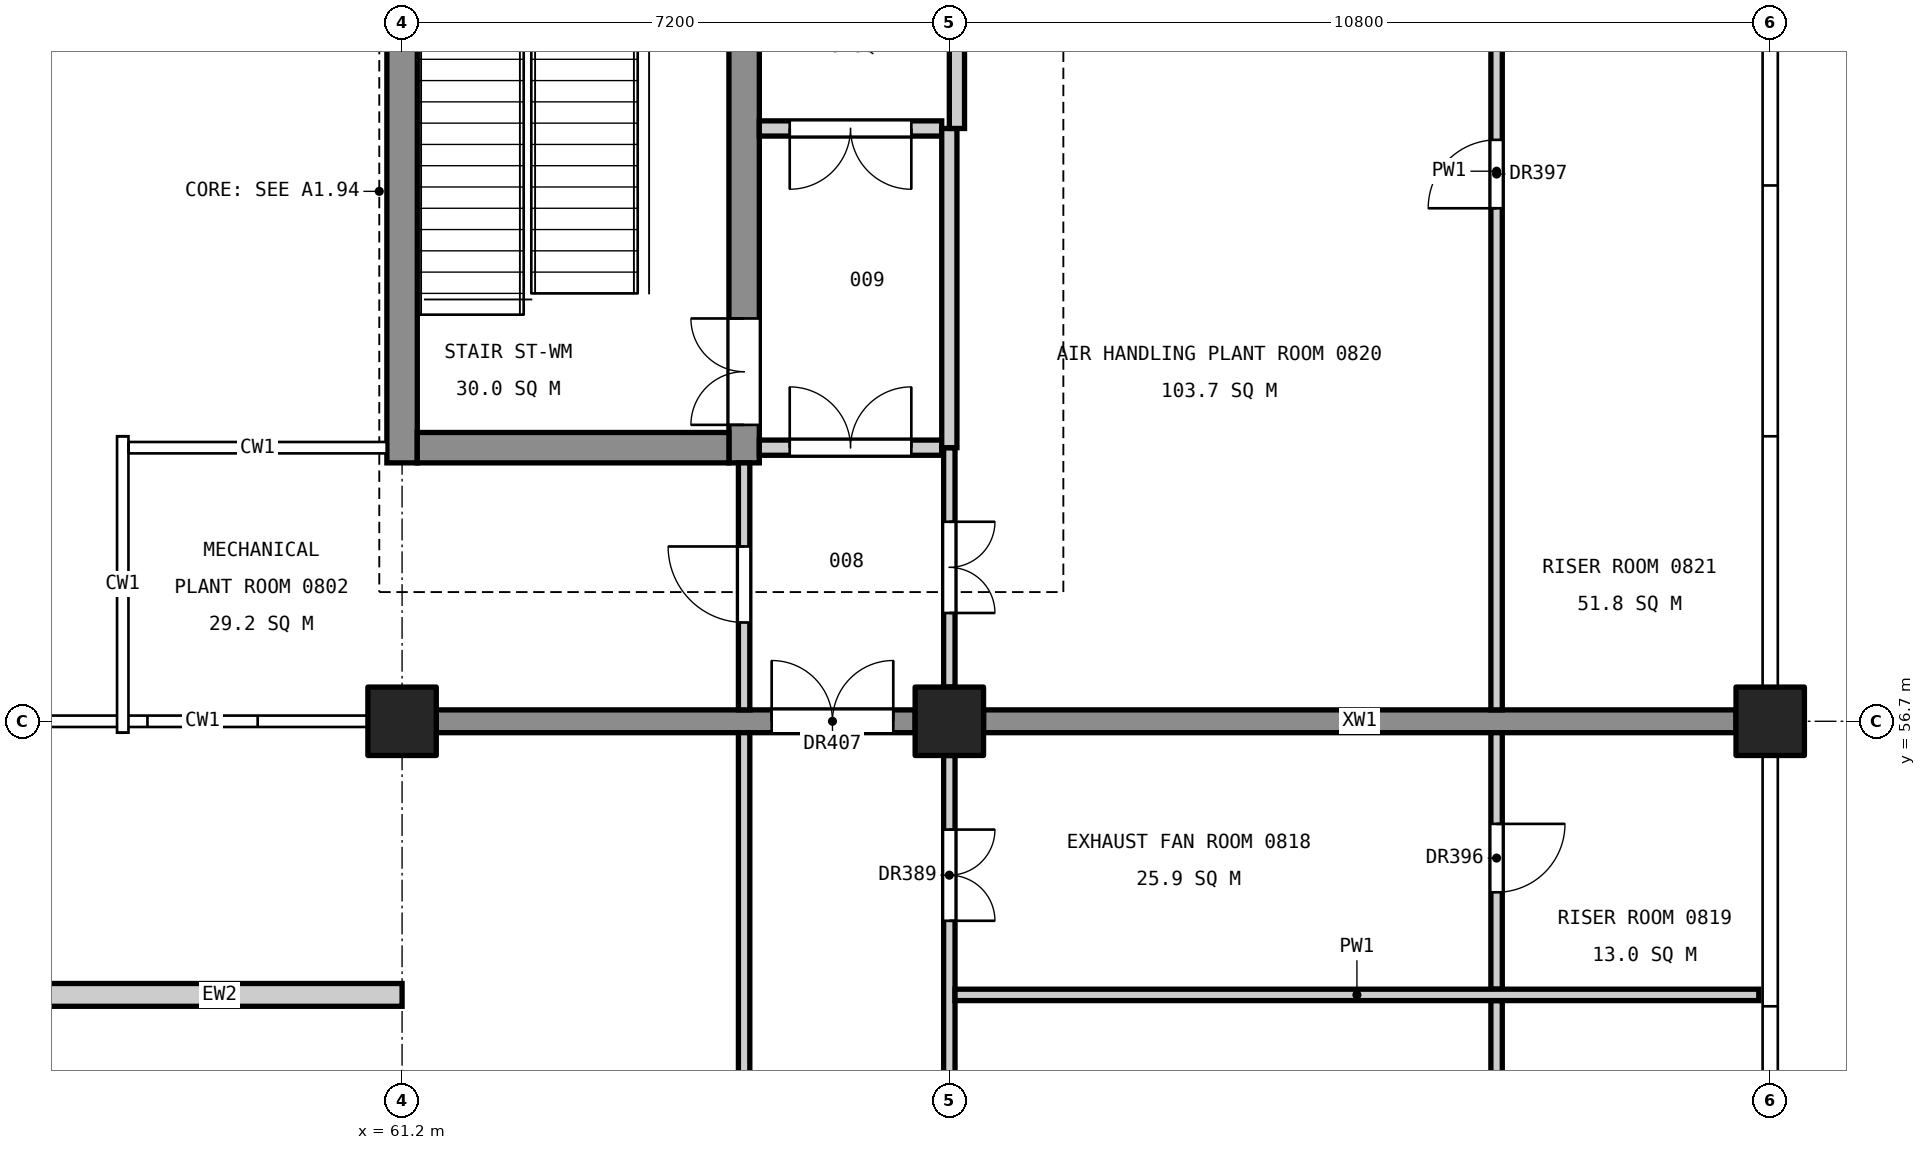
"""IFC4 building model, lengths in metres.
Left out: names, types, materials, properties, quantities, classifications, styles, units other than length and angle.
Written with IfcOpenShell. Run it as: python <this file> out.ifc"""

import sys

from ifc_helpers import new_model, si_unit, direction, frame, frame_2d, origin, origin_2d, place, context, subcontext, project, spatial, rectangle, extrude, element, fill, save


model = new_model("IFC4")
c1 = context("Model", 3, precision=1e-05, world=origin(), true_north=direction((0.0, 1.0)))
c2 = subcontext(c1, "Body", "Model", "MODEL_VIEW")
j1 = project(units=[si_unit("LENGTHUNIT", "METRE"), si_unit("PLANEANGLEUNIT", "RADIAN")], contexts=[c1])
p1 = place(None, origin())
s1 = spatial("IfcSite", under=j1, at=p1, CompositionType="ELEMENT")
p2 = place(p1, origin())
s2 = spatial("IfcBuilding", under=s1, at=p2, CompositionType="ELEMENT")
p3 = place(p2, frame((0.0, 0.0, 41.4)))
s3 = spatial("IfcBuildingStorey", under=s2, at=p3, CompositionType="ELEMENT", Elevation=41.4)
for number, where, z_axis, x_axis in (
    (1, (61.2, 56.7, 0.0), (0.0, 0.0, 1.0), (1.0, 0.0, 0.0)),
    (2, (68.4, 56.7, 0.0), (0.0, 0.0, 1.0), (1.0, 0.0, 0.0)),
    (3, (79.2, 56.7, 0.0), (0.0, 0.0, 1.0), (1.0, 0.0, 0.0)),
):
    element("IfcColumn", number, at=place(p3, frame(where, z_axis=z_axis, x_axis=x_axis)), inside=s3, PredefinedType="COLUMN", context=c2, shape_type="SweptSolid", body=[
        extrude(rectangle(XDim=0.9, YDim=0.9, at=origin_2d()), origin(), (0.0, 0.0, 1.0), 4.8),
    ])
p4 = place(p3, frame((61.2, 60.1, 0.0), z_axis=(0.0, 0.0, 1.0), x_axis=(0.0, 1.0, 0.0)))
e4 = element("IfcWall", 4, at=p4, inside=s3, PredefinedType="SHEAR", context=c2, shape_type="SweptSolid", body=[
    extrude(rectangle(XDim=14.8, YDim=0.4, at=frame_2d((7.4, 0.0))), origin(), (0.0, 0.0, 1.0), 4.55),
])
p5 = place(p4, frame((6.11, 0.0, 3.4)))
e5 = element("IfcOpeningElement", 5, at=p5, cuts=e4, PredefinedType="OPENING", context=c2, shape_type="SweptSolid", body=[
    extrude(rectangle(XDim=1.2, YDim=0.9, at=frame_2d((0.6, 0.45))), frame((0.0, 0.21, 0.0), z_axis=(0.0, -1.0, 0.0), x_axis=(1.0, 0.0, 0.0)), (0.0, 0.0, 1.0), 0.42),
])
p6 = place(p3, frame((65.7, 60.1, 0.0), z_axis=(0.0, 0.0, 1.0), x_axis=(0.0, 1.0, 0.0)))
e6 = element("IfcWall", 6, at=p6, inside=s3, PredefinedType="SHEAR", context=c2, shape_type="SweptSolid", body=[
    extrude(rectangle(XDim=14.8, YDim=0.4, at=frame_2d((7.4, 0.0))), origin(), (0.0, 0.0, 1.0), 4.55),
])
p7 = place(p6, frame((0.5, 0.0, 0.0)))
e7 = element("IfcOpeningElement", 7, at=p7, cuts=e6, PredefinedType="OPENING", context=c2, shape_type="SweptSolid", body=[
    extrude(rectangle(XDim=1.4, YDim=2.1, at=frame_2d((0.7, 1.05))), frame((0.0, 0.21, 0.0), z_axis=(0.0, -1.0, 0.0), x_axis=(1.0, 0.0, 0.0)), (0.0, 0.0, 1.0), 0.42),
])
p8 = place(p6, frame((8.8, 0.0, 0.0)))
e8 = element("IfcOpeningElement", 8, at=p8, cuts=e6, PredefinedType="OPENING", context=c2, shape_type="SweptSolid", body=[
    extrude(rectangle(XDim=1.1, YDim=2.1, at=frame_2d((0.55, 1.05))), frame((0.0, 0.21, 0.0), z_axis=(0.0, -1.0, 0.0), x_axis=(1.0, 0.0, 0.0)), (0.0, 0.0, 1.0), 0.42),
])
p9 = place(p6, frame((11.35, 0.0, 0.0)))
e9 = element("IfcOpeningElement", 9, at=p9, cuts=e6, PredefinedType="OPENING", context=c2, shape_type="SweptSolid", body=[
    extrude(rectangle(XDim=1.1, YDim=2.1, at=frame_2d((0.55, 1.05))), frame((0.0, 0.21, 0.0), z_axis=(0.0, -1.0, 0.0), x_axis=(1.0, 0.0, 0.0)), (0.0, 0.0, 1.0), 0.42),
])
p10 = place(p3, frame((61.4, 60.3, 0.0), z_axis=(0.0, 0.0, 1.0), x_axis=(1.0, 0.0, 0.0)))
e10 = element("IfcWall", 10, at=p10, inside=s3, PredefinedType="SHEAR", context=c2, shape_type="SweptSolid", body=[
    extrude(rectangle(XDim=4.1, YDim=0.4, at=frame_2d((2.05, 0.0))), origin(), (0.0, 0.0, 1.0), 4.55),
])
p11 = place(p3, frame((61.65, 56.7, 0.0), z_axis=(0.0, 0.0, 1.0), x_axis=(1.0, 0.0, 0.0)))
e11 = element("IfcWall", 11, at=p11, inside=s3, PredefinedType="SHEAR", context=c2, shape_type="SweptSolid", body=[
    extrude(rectangle(XDim=6.3, YDim=0.3, at=frame_2d((3.15, 0.0))), origin(), (0.0, 0.0, 1.0), 4.55),
])
p12 = place(p11, frame((4.413, 0.0, 0.0)))
e12 = element("IfcOpeningElement", 12, at=p12, cuts=e11, PredefinedType="OPENING", context=c2, shape_type="SweptSolid", body=[
    extrude(rectangle(XDim=1.6, YDim=2.1, at=frame_2d((0.8, 1.05))), frame((0.0, 0.16, 0.0), z_axis=(0.0, -1.0, 0.0), x_axis=(1.0, 0.0, 0.0)), (0.0, 0.0, 1.0), 0.32),
])
p13 = place(p3, frame((68.85, 56.7, 0.0), z_axis=(0.0, 0.0, 1.0), x_axis=(1.0, 0.0, 0.0)))
e13 = element("IfcWall", 13, at=p13, inside=s3, PredefinedType="SHEAR", context=c2, shape_type="SweptSolid", body=[
    extrude(rectangle(XDim=9.9, YDim=0.3, at=frame_2d((4.95, 0.0))), origin(), (0.0, 0.0, 1.0), 4.55),
])
p14 = place(p3, frame((56.4, 53.1, 0.0), z_axis=(0.0, 0.0, 1.0), x_axis=(1.0, 0.0, 0.0)))
e14 = element("IfcWall", 14, at=p14, inside=s3, PredefinedType="STANDARD", context=c2, shape_type="SweptSolid", body=[
    extrude(rectangle(XDim=4.8, YDim=0.3, at=frame_2d((2.4, 0.0))), origin(), (0.0, 0.0, 1.0), 3.65),
])
p15 = place(p3, frame((65.7, 46.1, 0.0), z_axis=(0.0, 0.0, 1.0), x_axis=(0.0, 1.0, 0.0)))
e15 = element("IfcWall", 15, at=p15, inside=s3, PredefinedType="PARTITIONING", context=c2, shape_type="SweptSolid", body=[
    extrude(rectangle(XDim=10.45, YDim=0.15, at=frame_2d((5.225, 0.0))), origin(), (0.0, 0.0, 1.0), 3.55),
])
p16 = place(p15, frame((4.7, 0.0, 0.0)))
e16 = element("IfcOpeningElement", 16, at=p16, cuts=e15, PredefinedType="OPENING", context=c2, shape_type="SweptSolid", body=[
    extrude(rectangle(XDim=1.0, YDim=2.1, at=frame_2d((0.5, 1.05))), frame((0.0, 0.085, 0.0), z_axis=(0.0, -1.0, 0.0), x_axis=(1.0, 0.0, 0.0)), (0.0, 0.0, 1.0), 0.17),
])
p17 = place(p3, frame((65.7, 56.85, 0.0), z_axis=(0.0, 0.0, 1.0), x_axis=(0.0, 1.0, 0.0)))
e17 = element("IfcWall", 17, at=p17, inside=s3, PredefinedType="PARTITIONING", context=c2, shape_type="SweptSolid", body=[
    extrude(rectangle(XDim=3.25, YDim=0.15, at=frame_2d((1.625, 0.0))), origin(), (0.0, 0.0, 1.0), 3.55),
])
p18 = place(p17, frame((1.15, 0.0, 0.0)))
e18 = element("IfcOpeningElement", 18, at=p18, cuts=e17, PredefinedType="OPENING", context=c2, shape_type="SweptSolid", body=[
    extrude(rectangle(XDim=1.0, YDim=2.1, at=frame_2d((0.5, 1.05))), frame((0.0, 0.085, 0.0), z_axis=(0.0, -1.0, 0.0), x_axis=(1.0, 0.0, 0.0)), (0.0, 0.0, 1.0), 0.17),
])
p19 = place(p3, frame((65.9, 60.3, 0.0), z_axis=(0.0, 0.0, 1.0), x_axis=(1.0, 0.0, 0.0)))
e19 = element("IfcWall", 19, at=p19, inside=s3, PredefinedType="PARTITIONING", context=c2, shape_type="SweptSolid", body=[
    extrude(rectangle(XDim=2.4, YDim=0.2, at=frame_2d((1.2, 0.0))), origin(), (0.0, 0.0, 1.0), 3.85),
])
p20 = place(p19, frame((0.4, 0.0, 0.0)))
e20 = element("IfcOpeningElement", 20, at=p20, cuts=e19, PredefinedType="OPENING", context=c2, shape_type="SweptSolid", body=[
    extrude(rectangle(XDim=1.6, YDim=2.1, at=frame_2d((0.8, 1.05))), frame((0.0, 0.11, 0.0), z_axis=(0.0, -1.0, 0.0), x_axis=(1.0, 0.0, 0.0)), (0.0, 0.0, 1.0), 0.22),
])
p21 = place(p3, frame((65.9, 64.5, 0.0), z_axis=(0.0, 0.0, 1.0), x_axis=(1.0, 0.0, 0.0)))
e21 = element("IfcWall", 21, at=p21, inside=s3, PredefinedType="PARTITIONING", context=c2, shape_type="SweptSolid", body=[
    extrude(rectangle(XDim=2.4, YDim=0.2, at=frame_2d((1.2, 0.0))), origin(), (0.0, 0.0, 1.0), 3.55),
])
p22 = place(p21, frame((0.4, 0.0, 0.0)))
e22 = element("IfcOpeningElement", 22, at=p22, cuts=e21, PredefinedType="OPENING", context=c2, shape_type="SweptSolid", body=[
    extrude(rectangle(XDim=1.6, YDim=2.1, at=frame_2d((0.8, 1.05))), frame((0.0, 0.11, 0.0), z_axis=(0.0, -1.0, 0.0), x_axis=(1.0, 0.0, 0.0)), (0.0, 0.0, 1.0), 0.22),
])
p23 = place(p3, frame((68.4, 46.35, 0.0), z_axis=(0.0, 0.0, 1.0), x_axis=(0.0, 1.0, 0.0)))
e23 = element("IfcWall", 23, at=p23, inside=s3, PredefinedType="PARTITIONING", context=c2, shape_type="SweptSolid", body=[
    extrude(rectangle(XDim=9.9, YDim=0.15, at=frame_2d((4.95, 0.0))), origin(), (0.0, 0.0, 1.0), 3.55),
])
p24 = place(p23, frame((2.775, 0.0, 0.0)))
e24 = element("IfcOpeningElement", 24, at=p24, cuts=e23, PredefinedType="OPENING", context=c2, shape_type="SweptSolid", body=[
    extrude(rectangle(XDim=1.2, YDim=2.1, at=frame_2d((0.6, 1.05))), frame((0.0, 0.085, 0.0), z_axis=(0.0, -1.0, 0.0), x_axis=(1.0, 0.0, 0.0)), (0.0, 0.0, 1.0), 0.17),
])
p25 = place(p23, frame((7.725, 0.0, 0.0)))
e25 = element("IfcOpeningElement", 25, at=p25, cuts=e23, PredefinedType="OPENING", context=c2, shape_type="SweptSolid", body=[
    extrude(rectangle(XDim=1.2, YDim=2.1, at=frame_2d((0.6, 1.05))), frame((0.0, 0.085, 0.0), z_axis=(0.0, -1.0, 0.0), x_axis=(1.0, 0.0, 0.0)), (0.0, 0.0, 1.0), 0.17),
])
p26 = place(p3, frame((68.4, 57.15, 0.0), z_axis=(0.0, 0.0, 1.0), x_axis=(0.0, 1.0, 0.0)))
e26 = element("IfcWall", 26, at=p26, inside=s3, PredefinedType="PARTITIONING", context=c2, shape_type="SweptSolid", body=[
    extrude(rectangle(XDim=3.15, YDim=0.15, at=frame_2d((1.575, 0.0))), origin(), (0.0, 0.0, 1.0), 3.55),
])
p27 = place(p26, frame((0.975, 0.0, 0.0)))
e27 = element("IfcOpeningElement", 27, at=p27, cuts=e26, PredefinedType="OPENING", context=c2, shape_type="SweptSolid", body=[
    extrude(rectangle(XDim=1.2, YDim=2.1, at=frame_2d((0.6, 1.05))), frame((0.0, 0.085, 0.0), z_axis=(0.0, -1.0, 0.0), x_axis=(1.0, 0.0, 0.0)), (0.0, 0.0, 1.0), 0.17),
])
p28 = place(p3, frame((68.4, 60.3, 0.0), z_axis=(0.0, 0.0, 1.0), x_axis=(0.0, 1.0, 0.0)))
e28 = element("IfcWall", 28, at=p28, inside=s3, PredefinedType="PARTITIONING", context=c2, shape_type="SweptSolid", body=[
    extrude(rectangle(XDim=4.2, YDim=0.2, at=frame_2d((2.1, 0.0))), origin(), (0.0, 0.0, 1.0), 3.55),
])
p29 = place(p3, frame((68.5, 64.5, 0.0), z_axis=(0.0, 0.0, 1.0), x_axis=(0.0, 1.0, 0.0)))
e29 = element("IfcWall", 29, at=p29, inside=s3, PredefinedType="PARTITIONING", context=c2, shape_type="SweptSolid", body=[
    extrude(rectangle(XDim=2.55, YDim=0.2, at=frame_2d((1.275, 0.0))), origin(), (0.0, 0.0, 1.0), 3.55),
])
p30 = place(p3, frame((75.6, 45.975, 0.0), z_axis=(0.0, 0.0, 1.0), x_axis=(0.0, 1.0, 0.0)))
e30 = element("IfcWall", 30, at=p30, inside=s3, PredefinedType="PARTITIONING", context=c2, shape_type="SweptSolid", body=[
    extrude(rectangle(XDim=7.05, YDim=0.15, at=frame_2d((3.525, 0.0))), origin(), (0.0, 0.0, 1.0), 3.55),
])
p31 = place(p30, frame((3.075, 0.0, 0.0)))
e31 = element("IfcOpeningElement", 31, at=p31, cuts=e30, PredefinedType="OPENING", context=c2, shape_type="SweptSolid", body=[
    extrude(rectangle(XDim=0.9, YDim=2.1, at=frame_2d((0.45, 1.05))), frame((0.0, 0.085, 0.0), z_axis=(0.0, -1.0, 0.0), x_axis=(1.0, 0.0, 0.0)), (0.0, 0.0, 1.0), 0.17),
])
p32 = place(p3, frame((75.6, 53.175, 0.0), z_axis=(0.0, 0.0, 1.0), x_axis=(0.0, 1.0, 0.0)))
e32 = element("IfcWall", 32, at=p32, inside=s3, PredefinedType="PARTITIONING", context=c2, shape_type="SweptSolid", body=[
    extrude(rectangle(XDim=3.375, YDim=0.15, at=frame_2d((1.688, 0.0))), origin(), (0.0, 0.0, 1.0), 3.55),
])
p33 = place(p32, frame((1.275, 0.0, 0.0)))
e33 = element("IfcOpeningElement", 33, at=p33, cuts=e32, PredefinedType="OPENING", context=c2, shape_type="SweptSolid", body=[
    extrude(rectangle(XDim=0.9, YDim=2.1, at=frame_2d((0.45, 1.05))), frame((0.0, 0.085, 0.0), z_axis=(0.0, -1.0, 0.0), x_axis=(1.0, 0.0, 0.0)), (0.0, 0.0, 1.0), 0.17),
])
p34 = place(p3, frame((75.6, 56.85, 0.0), z_axis=(0.0, 0.0, 1.0), x_axis=(0.0, 1.0, 0.0)))
e34 = element("IfcWall", 34, at=p34, inside=s3, PredefinedType="PARTITIONING", context=c2, shape_type="SweptSolid", body=[
    extrude(rectangle(XDim=14.175, YDim=0.15, at=frame_2d((7.087, 0.0))), origin(), (0.0, 0.0, 1.0), 3.55),
])
p35 = place(p34, frame((6.6, 0.0, 0.0)))
e35 = element("IfcOpeningElement", 35, at=p35, cuts=e34, PredefinedType="OPENING", context=c2, shape_type="SweptSolid", body=[
    extrude(rectangle(XDim=0.9, YDim=2.1, at=frame_2d((0.45, 1.05))), frame((0.0, 0.085, 0.0), z_axis=(0.0, -1.0, 0.0), x_axis=(1.0, 0.0, 0.0)), (0.0, 0.0, 1.0), 0.17),
])
p36 = place(p3, frame((68.475, 53.1, 0.0), z_axis=(0.0, 0.0, 1.0), x_axis=(1.0, 0.0, 0.0)))
e36 = element("IfcWall", 36, at=p36, inside=s3, PredefinedType="PARTITIONING", context=c2, shape_type="SweptSolid", body=[
    extrude(rectangle(XDim=10.575, YDim=0.15, at=frame_2d((5.288, 0.0))), origin(), (0.0, 0.0, 1.0), 3.85),
])
p37 = place(p7, origin())
e37 = element("IfcDoor", 37, at=p37, inside=s3, OperationType="DOUBLE_DOOR_SINGLE_SWING", PredefinedType="DOOR", context=c2, shape_type="SweptSolid", body=[
    extrude(rectangle(XDim=1.4, YDim=2.1, at=frame_2d((0.7, 1.05))), frame((0.0, 0.025, 0.0), z_axis=(0.0, -1.0, 0.0), x_axis=(1.0, 0.0, 0.0)), (0.0, 0.0, 1.0), 0.05),
])
fill(e7, e37)
p38 = place(p27, frame((1.2, 0.0, 0.0), z_axis=(0.0, 0.0, 1.0), x_axis=(-1.0, 0.0, 0.0)))
e38 = element("IfcDoor", 38, at=p38, inside=s3, OperationType="DOUBLE_DOOR_SINGLE_SWING", PredefinedType="DOOR", context=c2, shape_type="SweptSolid", body=[
    extrude(rectangle(XDim=1.2, YDim=2.1, at=frame_2d((0.6, 1.05))), frame((0.0, 0.025, 0.0), z_axis=(0.0, -1.0, 0.0), x_axis=(1.0, 0.0, 0.0)), (0.0, 0.0, 1.0), 0.05),
])
fill(e27, e38)
p39 = place(p25, frame((1.2, 0.0, 0.0), z_axis=(0.0, 0.0, 1.0), x_axis=(-1.0, 0.0, 0.0)))
e39 = element("IfcDoor", 39, at=p39, inside=s3, OperationType="DOUBLE_DOOR_SINGLE_SWING", PredefinedType="DOOR", context=c2, shape_type="SweptSolid", body=[
    extrude(rectangle(XDim=1.2, YDim=2.1, at=frame_2d((0.6, 1.05))), frame((0.0, 0.025, 0.0), z_axis=(0.0, -1.0, 0.0), x_axis=(1.0, 0.0, 0.0)), (0.0, 0.0, 1.0), 0.05),
])
fill(e25, e39)
p40 = place(p18, origin())
e40 = element("IfcDoor", 40, at=p40, inside=s3, OperationType="SINGLE_SWING_RIGHT", PredefinedType="DOOR", context=c2, shape_type="SweptSolid", body=[
    extrude(rectangle(XDim=1.0, YDim=2.1, at=frame_2d((0.5, 1.05))), frame((0.0, 0.025, 0.0), z_axis=(0.0, -1.0, 0.0), x_axis=(1.0, 0.0, 0.0)), (0.0, 0.0, 1.0), 0.05),
])
fill(e18, e40)
p41 = place(p33, frame((0.9, 0.0, 0.0), z_axis=(0.0, 0.0, 1.0), x_axis=(-1.0, 0.0, 0.0)))
e41 = element("IfcDoor", 41, at=p41, inside=s3, OperationType="SINGLE_SWING_LEFT", PredefinedType="DOOR", context=c2, shape_type="SweptSolid", body=[
    extrude(rectangle(XDim=0.9, YDim=2.1, at=frame_2d((0.45, 1.05))), frame((0.0, 0.025, 0.0), z_axis=(0.0, -1.0, 0.0), x_axis=(1.0, 0.0, 0.0)), (0.0, 0.0, 1.0), 0.05),
])
fill(e33, e41)
p42 = place(p35, origin())
e42 = element("IfcDoor", 42, at=p42, inside=s3, OperationType="SINGLE_SWING_LEFT", PredefinedType="DOOR", context=c2, shape_type="SweptSolid", body=[
    extrude(rectangle(XDim=0.9, YDim=2.1, at=frame_2d((0.45, 1.05))), frame((0.0, 0.025, 0.0), z_axis=(0.0, -1.0, 0.0), x_axis=(1.0, 0.0, 0.0)), (0.0, 0.0, 1.0), 0.05),
])
fill(e35, e42)
p43 = place(p20, origin())
e43 = element("IfcDoor", 43, at=p43, inside=s3, OperationType="DOUBLE_DOOR_SINGLE_SWING", PredefinedType="DOOR", context=c2, shape_type="SweptSolid", body=[
    extrude(rectangle(XDim=1.6, YDim=2.1, at=frame_2d((0.8, 1.05))), frame((0.0, 0.025, 0.0), z_axis=(0.0, -1.0, 0.0), x_axis=(1.0, 0.0, 0.0)), (0.0, 0.0, 1.0), 0.05),
])
fill(e20, e43)
p44 = place(p22, frame((1.6, 0.0, 0.0), z_axis=(0.0, 0.0, 1.0), x_axis=(-1.0, 0.0, 0.0)))
e44 = element("IfcDoor", 44, at=p44, inside=s3, OperationType="DOUBLE_DOOR_SINGLE_SWING", PredefinedType="DOOR", context=c2, shape_type="SweptSolid", body=[
    extrude(rectangle(XDim=1.6, YDim=2.1, at=frame_2d((0.8, 1.05))), frame((0.0, 0.025, 0.0), z_axis=(0.0, -1.0, 0.0), x_axis=(1.0, 0.0, 0.0)), (0.0, 0.0, 1.0), 0.05),
])
fill(e22, e44)
p45 = place(p12, origin())
e45 = element("IfcDoor", 45, at=p45, inside=s3, OperationType="DOUBLE_DOOR_SINGLE_SWING", PredefinedType="DOOR", context=c2, shape_type="SweptSolid", body=[
    extrude(rectangle(XDim=1.6, YDim=2.1, at=frame_2d((0.8, 1.05))), frame((0.0, 0.025, 0.0), z_axis=(0.0, -1.0, 0.0), x_axis=(1.0, 0.0, 0.0)), (0.0, 0.0, 1.0), 0.05),
])
fill(e12, e45)
save(model, sys.argv[1])
